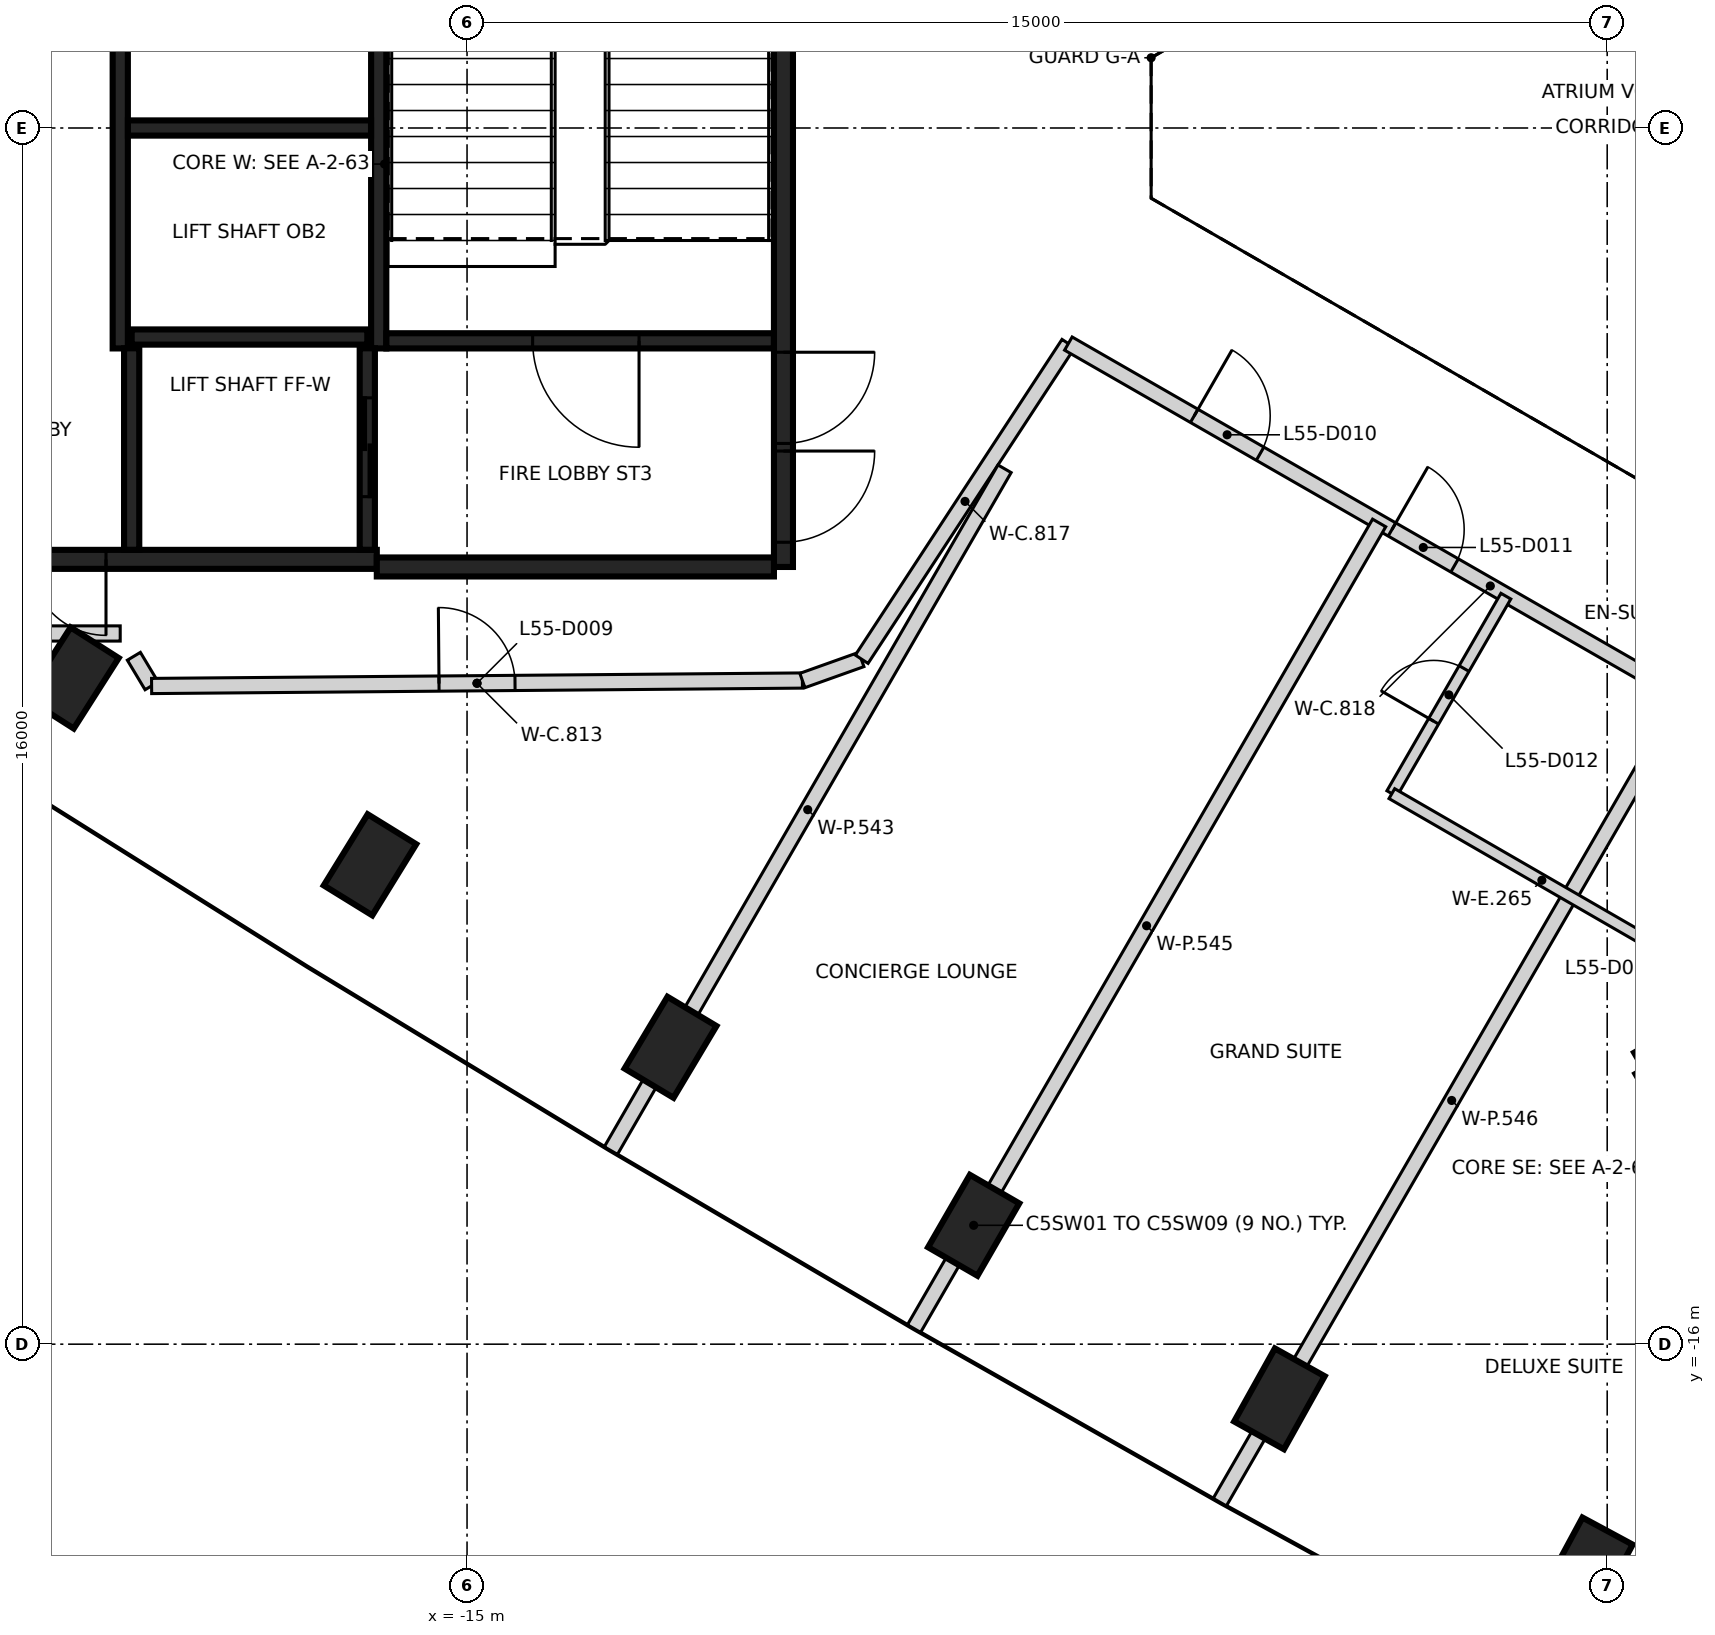
"""IFC4 building model, lengths in metres.
Left out: names, types, materials, properties, quantities, classifications, styles, units other than length and angle.
Written with IfcOpenShell. Run it as: python <this file> out.ifc"""

import sys

from ifc_helpers import new_model, si_unit, direction, frame, frame_2d, origin, origin_2d, place, context, subcontext, project, spatial, rectangle, extrude, element, fill, save


model = new_model("IFC4")
c1 = context("Model", 3, precision=1e-05, world=origin(), true_north=direction((0.0, 1.0)))
c2 = subcontext(c1, "Body", "Model", "MODEL_VIEW")
j1 = project(units=[si_unit("LENGTHUNIT", "METRE"), si_unit("PLANEANGLEUNIT", "RADIAN")], contexts=[c1])
p1 = place(None, origin())
s1 = spatial("IfcSite", under=j1, at=p1, CompositionType="ELEMENT")
p2 = place(p1, origin())
s2 = spatial("IfcBuilding", under=s1, at=p2, CompositionType="ELEMENT")
p3 = place(p2, frame((0.0, 0.0, 221.4)))
s3 = spatial("IfcBuildingStorey", under=s2, at=p3, CompositionType="ELEMENT", Elevation=221.4)
for number, where, z_axis, x_axis in (
    (1, (-20.195, -7.235, -0.35), (0.0, 0.0, 1.0), (0.538, 0.843, 0.0)),
    (2, (-16.277, -9.693, -0.35), (0.0, 0.0, 1.0), (0.525, 0.851, 0.0)),
    (3, (-12.323, -12.094, -0.35), (0.0, 0.0, 1.0), (0.513, 0.858, 0.0)),
    (4, (-8.335, -14.436, -0.35), (0.0, 0.0, 1.0), (0.5, 0.866, 0.0)),
    (5, (-4.312, -16.719, -0.35), (0.0, 0.0, 1.0), (0.487, 0.873, 0.0)),
    (6, (-0.256, -18.943, -0.35), (0.0, 0.0, 1.0), (0.475, 0.88, 0.0)),
):
    element("IfcColumn", number, at=place(p3, frame(where, z_axis=z_axis, x_axis=x_axis)), inside=s3, PredefinedType="COLUMN", context=c2, shape_type="SweptSolid", body=[
        extrude(rectangle(XDim=1.1, YDim=0.75, at=origin_2d()), origin(), (0.0, 0.0, 1.0), 3.6),
    ])
p4 = place(p3, frame((-10.837, 5.775, 0.0), z_axis=(0.0, 0.0, 1.0), x_axis=(0.0, -1.0, 0.0)))
e7 = element("IfcWall", 7, at=p4, inside=s3, PredefinedType="SHEAR", context=c2, shape_type="SweptSolid", body=[
    extrude(rectangle(XDim=11.55, YDim=0.25, at=frame_2d((5.775, 0.0))), origin(), (0.0, 0.0, 1.0), 3.25),
])
p5 = place(p4, frame((10.025, 0.0, 0.0)))
e8 = element("IfcOpeningElement", 8, at=p5, cuts=e7, PredefinedType="OPENING", context=c2, shape_type="SweptSolid", body=[
    extrude(rectangle(XDim=1.2, YDim=2.1, at=frame_2d((0.6, 1.05))), frame((0.0, 0.135, 0.0), z_axis=(0.0, -1.0, 0.0), x_axis=(1.0, 0.0, 0.0)), (0.0, 0.0, 1.0), 0.27),
])
p6 = place(p4, frame((8.725, 0.0, 0.0)))
e9 = element("IfcOpeningElement", 9, at=p6, cuts=e7, PredefinedType="OPENING", context=c2, shape_type="SweptSolid", body=[
    extrude(rectangle(XDim=1.2, YDim=2.1, at=frame_2d((0.6, 1.05))), frame((0.0, 0.135, 0.0), z_axis=(0.0, -1.0, 0.0), x_axis=(1.0, 0.0, 0.0)), (0.0, 0.0, 1.0), 0.27),
])
p7 = place(p3, frame((-16.187, -5.675, 0.0), z_axis=(0.0, 0.0, 1.0), x_axis=(-1.0, 0.0, 0.0)))
e10 = element("IfcWall", 10, at=p7, inside=s3, PredefinedType="SHEAR", context=c2, shape_type="SweptSolid", body=[
    extrude(rectangle(XDim=6.125, YDim=0.25, at=frame_2d((3.062, 0.0))), origin(), (0.0, 0.0, 1.0), 3.25),
])
p8 = place(p7, frame((3.563, 0.0, 0.0)))
e11 = element("IfcOpeningElement", 11, at=p8, cuts=e10, PredefinedType="OPENING", context=c2, shape_type="SweptSolid", body=[
    extrude(rectangle(XDim=1.0, YDim=2.1, at=frame_2d((0.5, 1.05))), frame((0.0, 0.135, 0.0), z_axis=(0.0, -1.0, 0.0), x_axis=(1.0, 0.0, 0.0)), (0.0, 0.0, 1.0), 0.27),
])
p9 = place(p3, frame((-10.963, -5.775, 0.0), z_axis=(0.0, 0.0, 1.0), x_axis=(-1.0, 0.0, 0.0)))
e12 = element("IfcWall", 12, at=p9, inside=s3, PredefinedType="SHEAR", context=c2, shape_type="SweptSolid", body=[
    extrude(rectangle(XDim=5.225, YDim=0.25, at=frame_2d((2.612, 0.0))), origin(), (0.0, 0.0, 1.0), 3.25),
])
p10 = place(p3, frame((-16.162, 3.074, 0.0), z_axis=(0.0, 0.0, 1.0), x_axis=(0.0, -1.0, 0.0)))
e13 = element("IfcWall", 13, at=p10, inside=s3, PredefinedType="SHEAR", context=c2, shape_type="SweptSolid", body=[
    extrude(rectangle(XDim=5.974, YDim=0.2, at=frame_2d((2.987, 0.0))), origin(), (0.0, 0.0, 1.0), 3.25),
])
p11 = place(p3, frame((-19.562, -2.9, 0.0), z_axis=(0.0, 0.0, 1.0), x_axis=(0.0, 1.0, 0.0)))
e14 = element("IfcWall", 14, at=p11, inside=s3, PredefinedType="SHEAR", context=c2, shape_type="SweptSolid", body=[
    extrude(rectangle(XDim=6.1, YDim=0.2, at=frame_2d((3.05, 0.0))), origin(), (0.0, 0.0, 1.0), 3.25),
])
p12 = place(p3, frame((-10.963, -2.8, 0.0), z_axis=(0.0, 0.0, 1.0), x_axis=(-1.0, 0.0, 0.0)))
e15 = element("IfcWall", 15, at=p12, inside=s3, PredefinedType="SHEAR", context=c2, shape_type="SweptSolid", body=[
    extrude(rectangle(XDim=5.098, YDim=0.2, at=frame_2d((2.549, 0.0))), origin(), (0.0, 0.0, 1.0), 3.25),
])
p13 = place(p12, frame((1.774, 0.0, 0.0)))
e16 = element("IfcOpeningElement", 16, at=p13, cuts=e15, PredefinedType="OPENING", context=c2, shape_type="SweptSolid", body=[
    extrude(rectangle(XDim=1.4, YDim=2.1, at=frame_2d((0.7, 1.05))), frame((0.0, 0.11, 0.0), z_axis=(0.0, -1.0, 0.0), x_axis=(1.0, 0.0, 0.0)), (0.0, 0.0, 1.0), 0.22),
])
p14 = place(p3, frame((-16.263, 0.0, 0.0), z_axis=(0.0, 0.0, 1.0), x_axis=(-1.0, 0.0, 0.0)))
e17 = element("IfcWall", 17, at=p14, inside=s3, PredefinedType="SHEAR", context=c2, shape_type="SweptSolid", body=[
    extrude(rectangle(XDim=3.198, YDim=0.2, at=frame_2d((1.599, 0.0))), origin(), (0.0, 0.0, 1.0), 3.25),
])
p15 = place(p3, frame((-19.412, -2.75, 0.0), z_axis=(0.0, 0.0, 1.0), x_axis=(1.0, 0.0, 0.0)))
e18 = element("IfcWall", 18, at=p15, inside=s3, PredefinedType="SHEAR", context=c2, shape_type="SweptSolid", body=[
    extrude(rectangle(XDim=3.1, YDim=0.2, at=frame_2d((1.55, 0.0))), origin(), (0.0, 0.0, 1.0), 3.25),
])
p16 = place(p3, frame((-16.312, -2.898, 0.0), z_axis=(0.0, 0.0, 1.0), x_axis=(0.0, -1.0, 0.0)))
e19 = element("IfcWall", 19, at=p16, inside=s3, PredefinedType="SHEAR", context=c2, shape_type="SweptSolid", body=[
    extrude(rectangle(XDim=2.651, YDim=0.2, at=frame_2d((1.325, 0.0))), origin(), (0.0, 0.0, 1.0), 3.25),
])
p17 = place(p16, frame((0.652, 0.0, 0.0)))
e20 = element("IfcOpeningElement", 20, at=p17, cuts=e19, PredefinedType="OPENING", context=c2, shape_type="SweptSolid", body=[
    extrude(rectangle(XDim=1.3, YDim=2.1, at=frame_2d((0.65, 1.05))), frame((0.0, 0.11, 0.0), z_axis=(0.0, -1.0, 0.0), x_axis=(1.0, 0.0, 0.0)), (0.0, 0.0, 1.0), 0.22),
])
p18 = place(p3, frame((-19.412, -5.549, 0.0), z_axis=(0.0, 0.0, 1.0), x_axis=(0.0, 1.0, 0.0)))
e21 = element("IfcWall", 21, at=p18, inside=s3, PredefinedType="SHEAR", context=c2, shape_type="SweptSolid", body=[
    extrude(rectangle(XDim=2.651, YDim=0.2, at=frame_2d((1.325, 0.0))), origin(), (0.0, 0.0, 1.0), 3.25),
])
p19 = place(p3, frame((0.417, -12.273, 0.0), z_axis=(0.0, 0.0, 1.0), x_axis=(0.866021906294, 0.500006057782, 0.0)))
e22 = element("IfcWall", 22, at=p19, inside=s3, PredefinedType="SHEAR", context=c2, shape_type="SweptSolid", body=[
    extrude(rectangle(XDim=11.55, YDim=0.25, at=frame_2d((5.775, 0.0))), origin(), (0.0, 0.0, 1.0), 3.25),
])
p20 = place(p19, frame((10.025, 0.0, 0.0)))
e23 = element("IfcOpeningElement", 23, at=p20, cuts=e22, PredefinedType="OPENING", context=c2, shape_type="SweptSolid", body=[
    extrude(rectangle(XDim=1.2, YDim=2.1, at=frame_2d((0.6, 1.05))), frame((0.0, 0.135, 0.0), z_axis=(0.0, -1.0, 0.0), x_axis=(1.0, 0.0, 0.0)), (0.0, 0.0, 1.0), 0.27),
])
p21 = place(p19, frame((8.725, 0.0, 0.0)))
e24 = element("IfcOpeningElement", 24, at=p21, cuts=e22, PredefinedType="OPENING", context=c2, shape_type="SweptSolid", body=[
    extrude(rectangle(XDim=1.2, YDim=2.1, at=frame_2d((0.6, 1.05))), frame((0.0, 0.135, 0.0), z_axis=(0.0, -1.0, 0.0), x_axis=(1.0, 0.0, 0.0)), (0.0, 0.0, 1.0), 0.27),
])
p22 = place(p3, frame((-20.95, -6.65, 0.0), z_axis=(0.0, 0.0, 1.0), x_axis=(1.0, 0.0, 0.0)))
e25 = element("IfcWall", 25, at=p22, inside=s3, PredefinedType="PARTITIONING", context=c2, shape_type="SweptSolid", body=[
    extrude(rectangle(XDim=1.387, YDim=0.2, at=frame_2d((0.693, 0.0))), origin(), (0.0, 0.0, 1.0), 2.35),
])
p23 = place(p3, frame((-19.15, -7.339, 0.0), z_axis=(0.0, 0.0, 1.0), x_axis=(-0.513941661048, 0.857825138964, 0.0)))
e26 = element("IfcWall", 26, at=p23, inside=s3, PredefinedType="PARTITIONING", context=c2, shape_type="SweptSolid", body=[
    extrude(rectangle(XDim=0.454, YDim=0.2, at=frame_2d((0.227, 0.0))), origin(), (0.0, 0.0, 1.0), 3.25),
])
p24 = place(p3, frame((-19.15, -7.341, 0.0), z_axis=(0.0, 0.0, 1.0), x_axis=(0.999964623126, 0.008411450351, 0.0)))
e27 = element("IfcWall", 27, at=p24, inside=s3, PredefinedType="PARTITIONING", context=c2, shape_type="SweptSolid", body=[
    extrude(rectangle(XDim=8.562, YDim=0.2, at=frame_2d((4.281, 0.0))), origin(), (0.0, 0.0, 1.0), 3.25),
])
p25 = place(p24, frame((3.781, 0.0, 0.0)))
e28 = element("IfcOpeningElement", 28, at=p25, cuts=e27, PredefinedType="OPENING", context=c2, shape_type="SweptSolid", body=[
    extrude(rectangle(XDim=1.0, YDim=2.1, at=frame_2d((0.5, 1.05))), frame((0.0, 0.11, 0.0), z_axis=(0.0, -1.0, 0.0), x_axis=(1.0, 0.0, 0.0)), (0.0, 0.0, 1.0), 0.22),
])
p26 = place(p3, frame((-10.588, -7.269, 0.0), z_axis=(0.0, 0.0, 1.0), x_axis=(0.941741911595, 0.336336396998, 0.0)))
e29 = element("IfcWall", 29, at=p26, inside=s3, PredefinedType="PARTITIONING", context=c2, shape_type="SweptSolid", body=[
    extrude(rectangle(XDim=0.824, YDim=0.2, at=frame_2d((0.412, 0.0))), origin(), (0.0, 0.0, 1.0), 3.25),
])
p27 = place(p3, frame((-9.808, -6.989, 0.0), z_axis=(0.0, 0.0, 1.0), x_axis=(0.547746188785, 0.836644555753, 0.0)))
e30 = element("IfcWall", 30, at=p27, inside=s3, PredefinedType="PARTITIONING", context=c2, shape_type="SweptSolid", body=[
    extrude(rectangle(XDim=4.964, YDim=0.2, at=frame_2d((2.482, 0.0))), origin(), (0.0, 0.0, 1.0), 3.25),
])
p28 = place(p3, frame((-7.089, -2.836, 0.0), z_axis=(0.0, 0.0, 1.0), x_axis=(0.867106243364, -0.498123240493, 0.0)))
e31 = element("IfcWall", 31, at=p28, inside=s3, PredefinedType="PARTITIONING", context=c2, shape_type="SweptSolid", body=[
    extrude(rectangle(XDim=12.804, YDim=0.2, at=frame_2d((6.402, 0.0))), origin(), (0.0, 0.0, 1.0), 3.25),
])
p29 = place(p28, frame((1.909, 0.0, 0.0)))
e32 = element("IfcOpeningElement", 32, at=p29, cuts=e31, PredefinedType="OPENING", context=c2, shape_type="SweptSolid", body=[
    extrude(rectangle(XDim=1.0, YDim=2.1, at=frame_2d((0.5, 1.05))), frame((0.0, 0.11, 0.0), z_axis=(0.0, -1.0, 0.0), x_axis=(1.0, 0.0, 0.0)), (0.0, 0.0, 1.0), 0.22),
])
p30 = place(p28, frame((4.91, 0.0, 0.0)))
e33 = element("IfcOpeningElement", 33, at=p30, cuts=e31, PredefinedType="OPENING", context=c2, shape_type="SweptSolid", body=[
    extrude(rectangle(XDim=0.95, YDim=2.1, at=frame_2d((0.475, 1.05))), frame((0.0, 0.11, 0.0), z_axis=(0.0, -1.0, 0.0), x_axis=(1.0, 0.0, 0.0)), (0.0, 0.0, 1.0), 0.22),
])
p31 = place(p28, frame((11.654, 0.0, 0.0)))
e34 = element("IfcOpeningElement", 34, at=p31, cuts=e31, PredefinedType="OPENING", context=c2, shape_type="SweptSolid", body=[
    extrude(rectangle(XDim=0.95, YDim=2.1, at=frame_2d((0.475, 1.05))), frame((0.0, 0.11, 0.0), z_axis=(0.0, -1.0, 0.0), x_axis=(1.0, 0.0, 0.0)), (0.0, 0.0, 1.0), 0.22),
])
p32 = place(p3, frame((-13.107, -13.453, 0.0), z_axis=(0.0, 0.0, 1.0), x_axis=(0.500020349827, 0.866013654488, 0.0)))
e35 = element("IfcWall", 35, at=p32, inside=s3, PredefinedType="PARTITIONING", context=c2, shape_type="SweptSolid", body=[
    extrude(rectangle(XDim=10.357, YDim=0.2, at=frame_2d((5.179, 0.0))), origin(), (0.0, 0.0, 1.0), 3.25),
])
p33 = place(p3, frame((-9.119, -15.795, 0.0), z_axis=(0.0, 0.0, 1.0), x_axis=(0.50001601051, 0.866016159915, 0.0)))
e36 = element("IfcWall", 36, at=p33, inside=s3, PredefinedType="PARTITIONING", context=c2, shape_type="SweptSolid", body=[
    extrude(rectangle(XDim=12.238, YDim=0.2, at=frame_2d((6.119, 0.0))), origin(), (0.0, 0.0, 1.0), 3.25),
])
p34 = place(p3, frame((-5.097, -18.078, 0.0), z_axis=(0.0, 0.0, 1.0), x_axis=(0.499960272111, 0.866048339477, 0.0)))
e37 = element("IfcWall", 37, at=p34, inside=s3, PredefinedType="PARTITIONING", context=c2, shape_type="SweptSolid", body=[
    extrude(rectangle(XDim=12.204, YDim=0.2, at=frame_2d((6.102, 0.0))), origin(), (0.0, 0.0, 1.0), 3.25),
])
p35 = place(p3, frame((-2.833, -8.757, 0.0), z_axis=(0.0, 0.0, 1.0), x_axis=(0.499990139034, 0.866031096941, 0.0)))
e38 = element("IfcWall", 38, at=p35, inside=s3, PredefinedType="PARTITIONING", context=c2, shape_type="SweptSolid", body=[
    extrude(rectangle(XDim=3.0, YDim=0.15, at=frame_2d((1.5, 0.0))), origin(), (0.0, 0.0, 1.0), 3.25),
])
p36 = place(p35, frame((1.1, 0.0, 0.0)))
e39 = element("IfcOpeningElement", 39, at=p36, cuts=e38, PredefinedType="OPENING", context=c2, shape_type="SweptSolid", body=[
    extrude(rectangle(XDim=0.8, YDim=2.1, at=frame_2d((0.4, 1.05))), frame((0.0, 0.085, 0.0), z_axis=(0.0, -1.0, 0.0), x_axis=(1.0, 0.0, 0.0)), (0.0, 0.0, 1.0), 0.17),
])
p37 = place(p3, frame((-2.833, -8.757, 0.0), z_axis=(0.0, 0.0, 1.0), x_axis=(0.866002713795, -0.500039298155, 0.0)))
e40 = element("IfcWall", 40, at=p37, inside=s3, PredefinedType="PARTITIONING", context=c2, shape_type="SweptSolid", body=[
    extrude(rectangle(XDim=4.558, YDim=0.15, at=frame_2d((2.279, 0.0))), origin(), (0.0, 0.0, 1.0), 3.25),
])
p38 = place(p17, origin())
e41 = element("IfcDoor", 41, at=p38, inside=s3, OperationType="SLIDING_TO_LEFT", PredefinedType="DOOR", context=c2, shape_type="SweptSolid", body=[
    extrude(rectangle(XDim=1.3, YDim=2.1, at=frame_2d((0.65, 1.05))), frame((0.0, 0.025, 0.0), z_axis=(0.0, -1.0, 0.0), x_axis=(1.0, 0.0, 0.0)), (0.0, 0.0, 1.0), 0.05),
])
fill(e20, e41)
p39 = place(p8, origin())
e42 = element("IfcDoor", 42, at=p39, inside=s3, OperationType="SINGLE_SWING_LEFT", PredefinedType="DOOR", context=c2, shape_type="SweptSolid", body=[
    extrude(rectangle(XDim=1.0, YDim=2.1, at=frame_2d((0.5, 1.05))), frame((0.0, 0.025, 0.0), z_axis=(0.0, -1.0, 0.0), x_axis=(1.0, 0.0, 0.0)), (0.0, 0.0, 1.0), 0.05),
])
fill(e11, e42)
p40 = place(p5, origin())
e43 = element("IfcDoor", 43, at=p40, inside=s3, OperationType="SINGLE_SWING_LEFT", PredefinedType="DOOR", context=c2, shape_type="SweptSolid", body=[
    extrude(rectangle(XDim=1.2, YDim=2.1, at=frame_2d((0.6, 1.05))), frame((0.0, 0.025, 0.0), z_axis=(0.0, -1.0, 0.0), x_axis=(1.0, 0.0, 0.0)), (0.0, 0.0, 1.0), 0.05),
])
fill(e8, e43)
p41 = place(p6, origin())
e44 = element("IfcDoor", 44, at=p41, inside=s3, OperationType="SINGLE_SWING_RIGHT", PredefinedType="DOOR", context=c2, shape_type="SweptSolid", body=[
    extrude(rectangle(XDim=1.2, YDim=2.1, at=frame_2d((0.6, 1.05))), frame((0.0, 0.025, 0.0), z_axis=(0.0, -1.0, 0.0), x_axis=(1.0, 0.0, 0.0)), (0.0, 0.0, 1.0), 0.05),
])
fill(e9, e44)
p42 = place(p13, origin())
e45 = element("IfcDoor", 45, at=p42, inside=s3, OperationType="SINGLE_SWING_LEFT", PredefinedType="DOOR", context=c2, shape_type="SweptSolid", body=[
    extrude(rectangle(XDim=1.4, YDim=2.1, at=frame_2d((0.7, 1.05))), frame((0.0, 0.025, 0.0), z_axis=(0.0, -1.0, 0.0), x_axis=(1.0, 0.0, 0.0)), (0.0, 0.0, 1.0), 0.05),
])
fill(e16, e45)
p43 = place(p25, origin())
e46 = element("IfcDoor", 46, at=p43, inside=s3, OperationType="SINGLE_SWING_LEFT", PredefinedType="DOOR", context=c2, shape_type="SweptSolid", body=[
    extrude(rectangle(XDim=1.0, YDim=2.1, at=frame_2d((0.5, 1.05))), frame((0.0, 0.025, 0.0), z_axis=(0.0, -1.0, 0.0), x_axis=(1.0, 0.0, 0.0)), (0.0, 0.0, 1.0), 0.05),
])
fill(e28, e46)
p44 = place(p29, frame((1.0, 0.0, 0.0), z_axis=(0.0, 0.0, 1.0), x_axis=(-1.0, 0.0, 0.0)))
e47 = element("IfcDoor", 47, at=p44, inside=s3, OperationType="SINGLE_SWING_LEFT", PredefinedType="DOOR", context=c2, shape_type="SweptSolid", body=[
    extrude(rectangle(XDim=1.0, YDim=2.1, at=frame_2d((0.5, 1.05))), frame((0.0, 0.025, 0.0), z_axis=(0.0, -1.0, 0.0), x_axis=(1.0, 0.0, 0.0)), (0.0, 0.0, 1.0), 0.05),
])
fill(e32, e47)
p45 = place(p30, frame((0.95, 0.0, 0.0), z_axis=(0.0, 0.0, 1.0), x_axis=(-1.0, 0.0, 0.0)))
e48 = element("IfcDoor", 48, at=p45, inside=s3, OperationType="SINGLE_SWING_LEFT", PredefinedType="DOOR", context=c2, shape_type="SweptSolid", body=[
    extrude(rectangle(XDim=0.95, YDim=2.1, at=frame_2d((0.475, 1.05))), frame((0.0, 0.025, 0.0), z_axis=(0.0, -1.0, 0.0), x_axis=(1.0, 0.0, 0.0)), (0.0, 0.0, 1.0), 0.05),
])
fill(e33, e48)
p46 = place(p36, frame((0.8, 0.0, 0.0), z_axis=(0.0, 0.0, 1.0), x_axis=(-1.0, 0.0, 0.0)))
e49 = element("IfcDoor", 49, at=p46, inside=s3, OperationType="SINGLE_SWING_LEFT", PredefinedType="DOOR", context=c2, shape_type="SweptSolid", body=[
    extrude(rectangle(XDim=0.8, YDim=2.1, at=frame_2d((0.4, 1.05))), frame((0.0, 0.025, 0.0), z_axis=(0.0, -1.0, 0.0), x_axis=(1.0, 0.0, 0.0)), (0.0, 0.0, 1.0), 0.05),
])
fill(e39, e49)
save(model, sys.argv[1])
